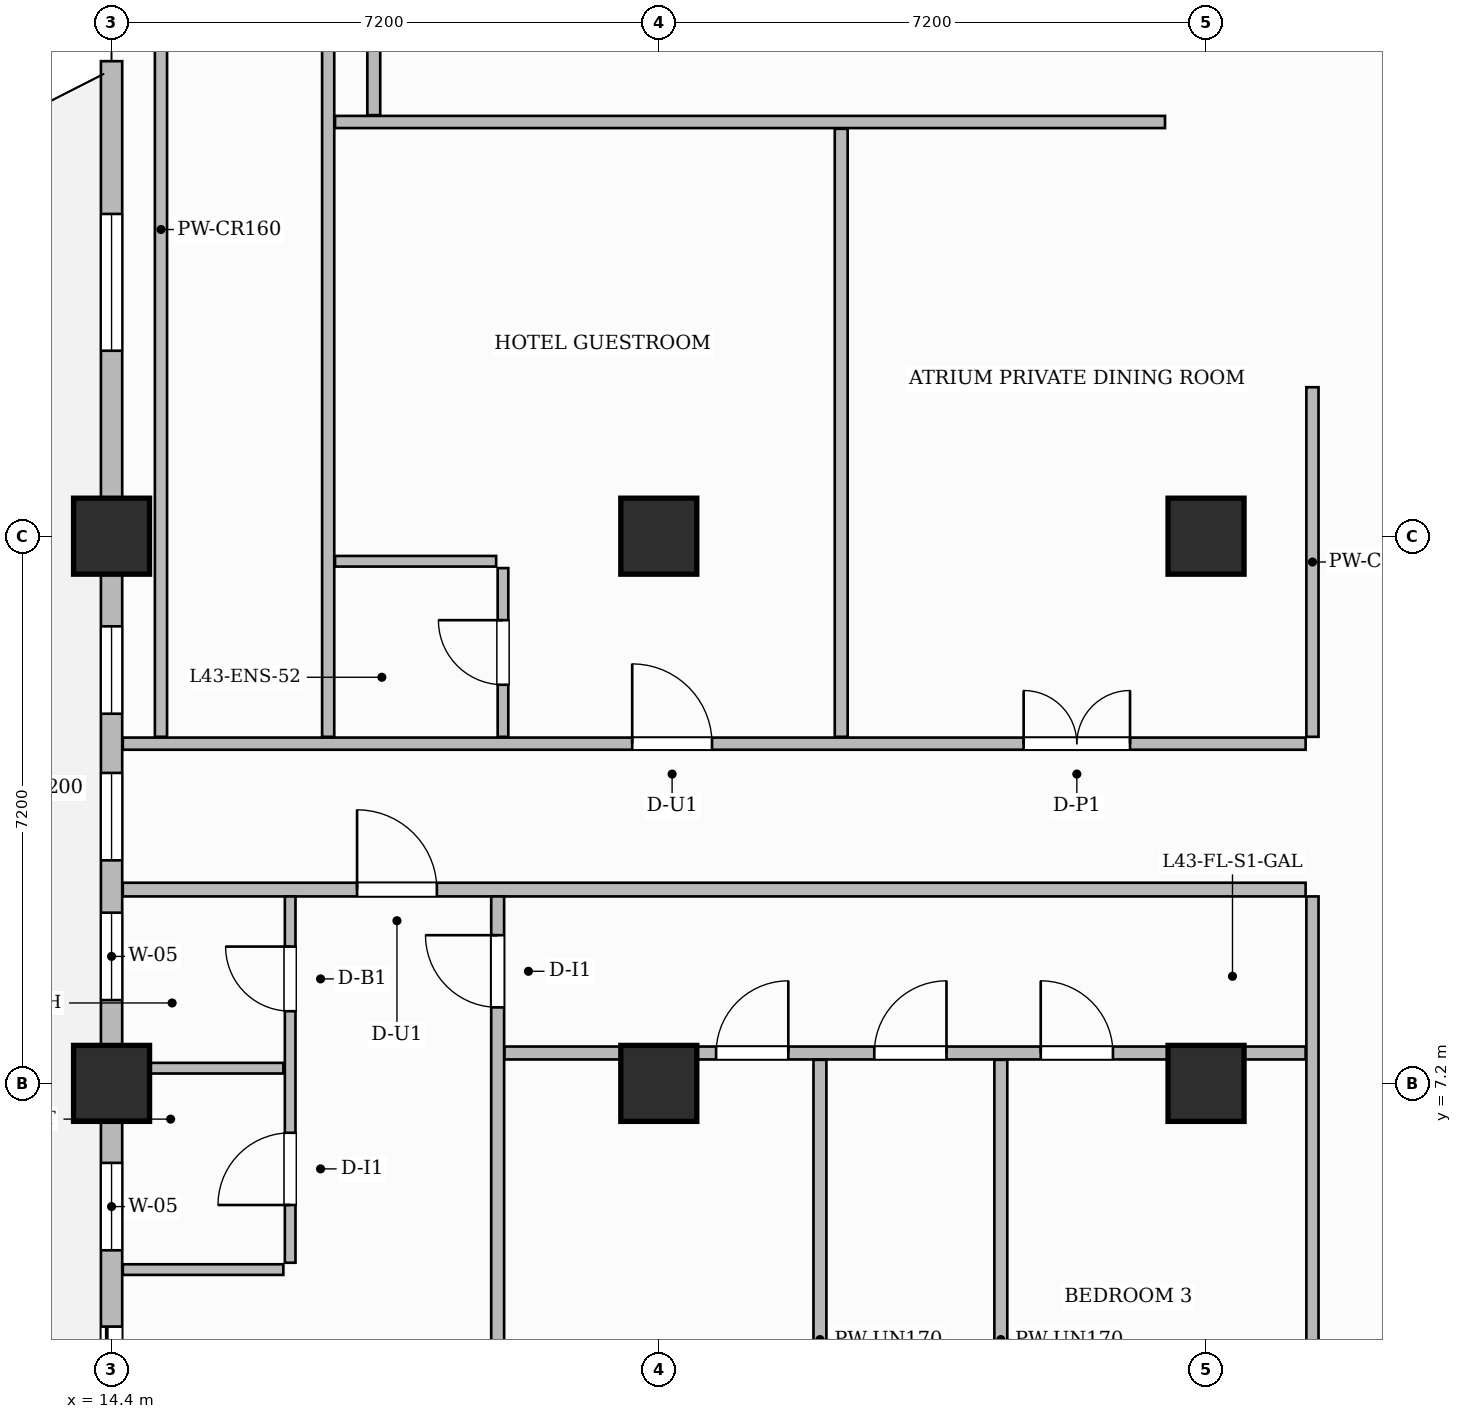
"""IFC4 building model, lengths in metres.
Left out: names, types, materials, properties, quantities, classifications, styles, units other than length and angle.
Written with IfcOpenShell. Run it as: python <this file> out.ifc"""

import sys

from ifc_helpers import new_model, si_unit, direction, frame, frame_2d, origin, origin_2d, place, context, subcontext, project, spatial, rectangle, extrude, source, transform, mapped, element, fill, save


model = new_model("IFC4")
c1 = context("Model", 3, precision=1e-05, world=origin(), true_north=direction((0.0, 1.0)))
c2 = subcontext(c1, "Body", "Model", "MODEL_VIEW")
j1 = project(units=[si_unit("LENGTHUNIT", "METRE"), si_unit("PLANEANGLEUNIT", "RADIAN")], contexts=[c1])
p1 = place(None, origin())
s1 = spatial("IfcSite", under=j1, at=p1, CompositionType="ELEMENT")
p2 = place(p1, origin())
s2 = spatial("IfcBuilding", under=s1, at=p2, CompositionType="ELEMENT")
p3 = place(p2, frame((0.0, 0.0, 173.4)))
s3 = spatial("IfcBuildingStorey", under=s2, at=p3, CompositionType="ELEMENT", Elevation=173.4)
m1 = source(origin(), c2, "Body", "SweptSolid", [
    extrude(rectangle(XDim=1.0, YDim=1.0, at=origin_2d()), origin(), (0.0, 0.0, 1.0), 3.85),
])
for number, where, z_axis, x_axis in (
    (1, (14.4, 7.2, 0.0), (0.0, 0.0, 1.0), (1.0, 0.0, 0.0)),
    (2, (14.4, 14.4, 0.0), (0.0, 0.0, 1.0), (1.0, 0.0, 0.0)),
    (3, (21.6, 7.2, 0.0), (0.0, 0.0, 1.0), (1.0, 0.0, 0.0)),
    (4, (21.6, 14.4, 0.0), (0.0, 0.0, 1.0), (1.0, 0.0, 0.0)),
    (5, (28.8, 7.2, 0.0), (0.0, 0.0, 1.0), (1.0, 0.0, 0.0)),
    (6, (28.8, 14.4, 0.0), (0.0, 0.0, 1.0), (1.0, 0.0, 0.0)),
):
    element("IfcColumn", number, at=place(p3, frame(where, z_axis=z_axis, x_axis=x_axis)), inside=s3, PredefinedType="COLUMN", context=c2, shape_type="MappedRepresentation", body=[
        mapped(m1, transform((0.0, 0.0, 0.0), scale=1.0)),
    ])
p4 = place(p3, frame((14.548, 9.75, 0.0), z_axis=(0.0, 0.0, 1.0), x_axis=(1.0, 0.0, 0.0)))
e7 = element("IfcWall", 7, at=p4, inside=s3, PredefinedType="PARTITIONING", context=c2, shape_type="SweptSolid", body=[
    extrude(rectangle(XDim=15.562, YDim=0.18, at=frame_2d((7.781, 0.0))), origin(), (0.0, 0.0, 1.0), 3.6),
])
p5 = place(p4, frame((3.082, 0.0, 0.0)))
e8 = element("IfcOpeningElement", 8, at=p5, cuts=e7, PredefinedType="OPENING", context=c2, shape_type="SweptSolid", body=[
    extrude(rectangle(XDim=1.05, YDim=2.25, at=frame_2d((0.525, 1.125))), frame((0.0, 0.1, 0.0), z_axis=(0.0, -1.0, 0.0), x_axis=(1.0, 0.0, 0.0)), (0.0, 0.0, 1.0), 0.2),
])
p6 = place(p3, frame((14.548, 11.67, 0.0), z_axis=(0.0, 0.0, 1.0), x_axis=(1.0, 0.0, 0.0)))
e9 = element("IfcWall", 9, at=p6, inside=s3, PredefinedType="PARTITIONING", context=c2, shape_type="SweptSolid", body=[
    extrude(rectangle(XDim=15.562, YDim=0.16, at=frame_2d((7.781, 0.0))), origin(), (0.0, 0.0, 1.0), 3.6),
])
p7 = place(p6, frame((6.702, 0.0, 0.0)))
e10 = element("IfcOpeningElement", 10, at=p7, cuts=e9, PredefinedType="OPENING", context=c2, shape_type="SweptSolid", body=[
    extrude(rectangle(XDim=1.05, YDim=2.25, at=frame_2d((0.525, 1.125))), frame((0.0, 0.09, 0.0), z_axis=(0.0, -1.0, 0.0), x_axis=(1.0, 0.0, 0.0)), (0.0, 0.0, 1.0), 0.18),
])
p8 = place(p6, frame((11.852, 0.0, 0.0)))
e11 = element("IfcOpeningElement", 11, at=p8, cuts=e9, PredefinedType="OPENING", context=c2, shape_type="SweptSolid", body=[
    extrude(rectangle(XDim=1.4, YDim=2.35, at=frame_2d((0.7, 1.175))), frame((0.0, 0.09, 0.0), z_axis=(0.0, -1.0, 0.0), x_axis=(1.0, 0.0, 0.0)), (0.0, 0.0, 1.0), 0.18),
])
p9 = place(p3, frame((30.2, 11.76, 0.0), z_axis=(0.0, 0.0, 1.0), x_axis=(0.0, 1.0, 0.0)))
e12 = element("IfcWall", 12, at=p9, inside=s3, PredefinedType="PARTITIONING", context=c2, shape_type="SweptSolid", body=[
    extrude(rectangle(XDim=4.6, YDim=0.16, at=frame_2d((2.3, 0.0))), origin(), (0.0, 0.0, 1.0), 3.6),
])
p10 = place(p3, frame((30.2, 0.148, 0.0), z_axis=(0.0, 0.0, 1.0), x_axis=(0.0, 1.0, 0.0)))
e13 = element("IfcWall", 13, at=p10, inside=s3, PredefinedType="PARTITIONING", context=c2, shape_type="SweptSolid", body=[
    extrude(rectangle(XDim=9.512, YDim=0.16, at=frame_2d((4.756, 0.0))), origin(), (0.0, 0.0, 1.0), 3.6),
])
p11 = place(p10, frame((1.977, 0.0, 0.0)))
e14 = element("IfcOpeningElement", 14, at=p11, cuts=e13, PredefinedType="OPENING", context=c2, shape_type="SweptSolid", body=[
    extrude(rectangle(XDim=1.05, YDim=2.15, at=frame_2d((0.525, 1.075))), frame((0.0, 0.09, 0.0), z_axis=(0.0, -1.0, 0.0), x_axis=(1.0, 0.0, 0.0)), (0.0, 0.0, 1.0), 0.18),
])
p12 = place(p3, frame((16.75, 4.84, 0.0), z_axis=(0.0, 0.0, 1.0), x_axis=(0.0, 1.0, 0.0)))
e15 = element("IfcWall", 15, at=p12, inside=s3, PredefinedType="PARTITIONING", context=c2, shape_type="SweptSolid", body=[
    extrude(rectangle(XDim=4.82, YDim=0.14, at=frame_2d((2.41, 0.0))), origin(), (0.0, 0.0, 1.0), 3.6),
])
p13 = place(p12, frame((0.76, 0.0, 0.0)))
e16 = element("IfcOpeningElement", 16, at=p13, cuts=e15, PredefinedType="OPENING", context=c2, shape_type="SweptSolid", body=[
    extrude(rectangle(XDim=0.95, YDim=2.15, at=frame_2d((0.475, 1.075))), frame((0.0, 0.08, 0.0), z_axis=(0.0, -1.0, 0.0), x_axis=(1.0, 0.0, 0.0)), (0.0, 0.0, 1.0), 0.16),
])
p14 = place(p12, frame((3.31, 0.0, 0.0)))
e17 = element("IfcOpeningElement", 17, at=p14, cuts=e15, PredefinedType="OPENING", context=c2, shape_type="SweptSolid", body=[
    extrude(rectangle(XDim=0.85, YDim=2.1, at=frame_2d((0.425, 1.05))), frame((0.0, 0.08, 0.0), z_axis=(0.0, -1.0, 0.0), x_axis=(1.0, 0.0, 0.0)), (0.0, 0.0, 1.0), 0.16),
])
p15 = place(p3, frame((14.59, 7.4, 0.0), z_axis=(0.0, 0.0, 1.0), x_axis=(1.0, 0.0, 0.0)))
e18 = element("IfcWall", 18, at=p15, inside=s3, PredefinedType="PARTITIONING", context=c2, shape_type="SweptSolid", body=[
    extrude(rectangle(XDim=2.07, YDim=0.14, at=frame_2d((1.035, 0.0))), origin(), (0.0, 0.0, 1.0), 3.085),
])
p16 = place(p3, frame((14.548, 4.75, 0.0), z_axis=(0.0, 0.0, 1.0), x_axis=(1.0, 0.0, 0.0)))
e19 = element("IfcWall", 19, at=p16, inside=s3, PredefinedType="PARTITIONING", context=c2, shape_type="SweptSolid", body=[
    extrude(rectangle(XDim=2.112, YDim=0.14, at=frame_2d((1.056, 0.0))), origin(), (0.0, 0.0, 1.0), 3.6),
])
p17 = place(p3, frame((19.48, 0.148, 0.0), z_axis=(0.0, 0.0, 1.0), x_axis=(0.0, 1.0, 0.0)))
e20 = element("IfcWall", 20, at=p17, inside=s3, PredefinedType="PARTITIONING", context=c2, shape_type="SweptSolid", body=[
    extrude(rectangle(XDim=9.512, YDim=0.17, at=frame_2d((4.756, 0.0))), origin(), (0.0, 0.0, 1.0), 3.6),
])
p18 = place(p17, frame((8.052, 0.0, 0.0)))
e21 = element("IfcOpeningElement", 21, at=p18, cuts=e20, PredefinedType="OPENING", context=c2, shape_type="SweptSolid", body=[
    extrude(rectangle(XDim=0.95, YDim=2.15, at=frame_2d((0.475, 1.075))), frame((0.0, 0.095, 0.0), z_axis=(0.0, -1.0, 0.0), x_axis=(1.0, 0.0, 0.0)), (0.0, 0.0, 1.0), 0.19),
])
p19 = place(p3, frame((19.57, 7.6, 0.0), z_axis=(0.0, 0.0, 1.0), x_axis=(1.0, 0.0, 0.0)))
e22 = element("IfcWall", 22, at=p19, inside=s3, PredefinedType="PARTITIONING", context=c2, shape_type="SweptSolid", body=[
    extrude(rectangle(XDim=10.54, YDim=0.17, at=frame_2d((5.27, 0.0))), origin(), (0.0, 0.0, 1.0), 3.6),
])
p20 = place(p19, frame((2.784, 0.0, 0.0)))
e23 = element("IfcOpeningElement", 23, at=p20, cuts=e22, PredefinedType="OPENING", context=c2, shape_type="SweptSolid", body=[
    extrude(rectangle(XDim=0.95, YDim=2.15, at=frame_2d((0.475, 1.075))), frame((0.0, 0.095, 0.0), z_axis=(0.0, -1.0, 0.0), x_axis=(1.0, 0.0, 0.0)), (0.0, 0.0, 1.0), 0.19),
])
p21 = place(p19, frame((4.865, 0.0, 0.0)))
e24 = element("IfcOpeningElement", 24, at=p21, cuts=e22, PredefinedType="OPENING", context=c2, shape_type="SweptSolid", body=[
    extrude(rectangle(XDim=0.95, YDim=2.15, at=frame_2d((0.475, 1.075))), frame((0.0, 0.095, 0.0), z_axis=(0.0, -1.0, 0.0), x_axis=(1.0, 0.0, 0.0)), (0.0, 0.0, 1.0), 0.19),
])
p22 = place(p19, frame((7.055, 0.0, 0.0)))
e25 = element("IfcOpeningElement", 25, at=p22, cuts=e22, PredefinedType="OPENING", context=c2, shape_type="SweptSolid", body=[
    extrude(rectangle(XDim=0.95, YDim=2.15, at=frame_2d((0.475, 1.075))), frame((0.0, 0.095, 0.0), z_axis=(0.0, -1.0, 0.0), x_axis=(1.0, 0.0, 0.0)), (0.0, 0.0, 1.0), 0.19),
])
for number, where, z_axis, x_axis in (
    (26, (23.72, 0.148, 0.0), (0.0, 0.0, 1.0), (0.0, 1.0, 0.0)),
    (27, (26.1, 0.148, 0.0), (0.0, 0.0, 1.0), (0.0, 1.0, 0.0)),
):
    element("IfcWall", number, at=place(p3, frame(where, z_axis=z_axis, x_axis=x_axis)), inside=s3, PredefinedType="PARTITIONING", context=c2, shape_type="SweptSolid", body=[
        extrude(rectangle(XDim=7.362, YDim=0.17, at=frame_2d((3.681, 0.0))), origin(), (0.0, 0.0, 1.0), 3.6),
    ])
for number, where, z_axis, x_axis in (
    (28, (15.05, 11.76, 0.0), (0.0, 0.0, 1.0), (0.0, 1.0, 0.0)),
    (29, (17.25, 11.76, 0.0), (0.0, 0.0, 1.0), (0.0, 1.0, 0.0)),
):
    element("IfcWall", number, at=place(p3, frame(where, z_axis=z_axis, x_axis=x_axis)), inside=s3, PredefinedType="PARTITIONING", context=c2, shape_type="SweptSolid", body=[
        extrude(rectangle(XDim=13.35, YDim=0.16, at=frame_2d((6.675, 0.0))), origin(), (0.0, 0.0, 1.0), 3.6),
    ])
p23 = place(p3, frame((17.85, 19.94, 0.0), z_axis=(0.0, 0.0, 1.0), x_axis=(0.0, 1.0, 0.0)))
e30 = element("IfcWall", 30, at=p23, inside=s3, PredefinedType="PARTITIONING", context=c2, shape_type="SweptSolid", body=[
    extrude(rectangle(XDim=5.22, YDim=0.17, at=frame_2d((2.61, 0.0))), origin(), (0.0, 0.0, 1.0), 3.285),
])
p24 = place(p3, frame((17.34, 19.85, 0.0), z_axis=(0.0, 0.0, 1.0), x_axis=(1.0, 0.0, 0.0)))
e31 = element("IfcWall", 31, at=p24, inside=s3, PredefinedType="PARTITIONING", context=c2, shape_type="SweptSolid", body=[
    extrude(rectangle(XDim=10.92, YDim=0.16, at=frame_2d((5.46, 0.0))), origin(), (0.0, 0.0, 1.0), 3.6),
])
p25 = place(p3, frame((24.0, 11.76, 0.0), z_axis=(0.0, 0.0, 1.0), x_axis=(0.0, 1.0, 0.0)))
e32 = element("IfcWall", 32, at=p25, inside=s3, PredefinedType="PARTITIONING", context=c2, shape_type="SweptSolid", body=[
    extrude(rectangle(XDim=8.0, YDim=0.17, at=frame_2d((4.0, 0.0))), origin(), (0.0, 0.0, 1.0), 3.6),
])
p26 = place(p3, frame((19.55, 11.76, 0.0), z_axis=(0.0, 0.0, 1.0), x_axis=(0.0, 1.0, 0.0)))
e33 = element("IfcWall", 33, at=p26, inside=s3, PredefinedType="PARTITIONING", context=c2, shape_type="SweptSolid", body=[
    extrude(rectangle(XDim=2.22, YDim=0.14, at=frame_2d((1.11, 0.0))), origin(), (0.0, 0.0, 1.0), 3.6),
])
p27 = place(p26, frame((0.685, 0.0, 0.0)))
e34 = element("IfcOpeningElement", 34, at=p27, cuts=e33, PredefinedType="OPENING", context=c2, shape_type="SweptSolid", body=[
    extrude(rectangle(XDim=0.85, YDim=2.1, at=frame_2d((0.425, 1.05))), frame((0.0, 0.08, 0.0), z_axis=(0.0, -1.0, 0.0), x_axis=(1.0, 0.0, 0.0)), (0.0, 0.0, 1.0), 0.16),
])
p28 = place(p3, frame((17.34, 14.07, 0.0), z_axis=(0.0, 0.0, 1.0), x_axis=(1.0, 0.0, 0.0)))
e35 = element("IfcWall", 35, at=p28, inside=s3, PredefinedType="PARTITIONING", context=c2, shape_type="SweptSolid", body=[
    extrude(rectangle(XDim=2.12, YDim=0.14, at=frame_2d((1.06, 0.0))), origin(), (0.0, 0.0, 1.0), 3.6),
])
p29 = place(p3, frame((14.4, 0.05, 0.0), z_axis=(0.0, 0.0, 1.0), x_axis=(0.0, 1.0, 0.0)))
e36 = element("IfcWall", 36, at=p29, inside=s3, PredefinedType="SOLIDWALL", context=c2, shape_type="SweptSolid", body=[
    extrude(rectangle(XDim=20.6, YDim=0.28, at=frame_2d((10.3, 0.0))), origin(), (0.0, 0.0, 1.0), 3.085),
])
p30 = place(p29, frame((2.75, 0.0, 0.0)))
e37 = element("IfcOpeningElement", 37, at=p30, cuts=e36, PredefinedType="OPENING", context=c2, shape_type="SweptSolid", body=[
    extrude(rectangle(XDim=1.2, YDim=2.2, at=frame_2d((0.6, 1.1))), frame((0.0, 0.15, 0.0), z_axis=(0.0, -1.0, 0.0), x_axis=(1.0, 0.0, 0.0)), (0.0, 0.0, 1.0), 0.3),
])
p31 = place(p29, frame((1.025, 0.0, 0.8)))
e38 = element("IfcOpeningElement", 38, at=p31, cuts=e36, PredefinedType="OPENING", context=c2, shape_type="SweptSolid", body=[
    extrude(rectangle(XDim=1.15, YDim=1.8, at=frame_2d((0.575, 0.9))), frame((0.0, 0.15, 0.0), z_axis=(0.0, -1.0, 0.0), x_axis=(1.0, 0.0, 0.0)), (0.0, 0.0, 1.0), 0.3),
])
p32 = place(p29, frame((4.954, 0.0, 0.8)))
e39 = element("IfcOpeningElement", 39, at=p32, cuts=e36, PredefinedType="OPENING", context=c2, shape_type="SweptSolid", body=[
    extrude(rectangle(XDim=1.15, YDim=1.8, at=frame_2d((0.575, 0.9))), frame((0.0, 0.15, 0.0), z_axis=(0.0, -1.0, 0.0), x_axis=(1.0, 0.0, 0.0)), (0.0, 0.0, 1.0), 0.3),
])
p33 = place(p29, frame((8.246, 0.0, 0.8)))
e40 = element("IfcOpeningElement", 40, at=p33, cuts=e36, PredefinedType="OPENING", context=c2, shape_type="SweptSolid", body=[
    extrude(rectangle(XDim=1.15, YDim=1.8, at=frame_2d((0.575, 0.9))), frame((0.0, 0.15, 0.0), z_axis=(0.0, -1.0, 0.0), x_axis=(1.0, 0.0, 0.0)), (0.0, 0.0, 1.0), 0.3),
])
p34 = place(p29, frame((10.085, 0.0, 0.8)))
e41 = element("IfcOpeningElement", 41, at=p34, cuts=e36, PredefinedType="OPENING", context=c2, shape_type="SweptSolid", body=[
    extrude(rectangle(XDim=1.15, YDim=1.8, at=frame_2d((0.575, 0.9))), frame((0.0, 0.15, 0.0), z_axis=(0.0, -1.0, 0.0), x_axis=(1.0, 0.0, 0.0)), (0.0, 0.0, 1.0), 0.3),
])
p35 = place(p29, frame((12.014, 0.0, 0.8)))
e42 = element("IfcOpeningElement", 42, at=p35, cuts=e36, PredefinedType="OPENING", context=c2, shape_type="SweptSolid", body=[
    extrude(rectangle(XDim=1.15, YDim=1.8, at=frame_2d((0.575, 0.9))), frame((0.0, 0.15, 0.0), z_axis=(0.0, -1.0, 0.0), x_axis=(1.0, 0.0, 0.0)), (0.0, 0.0, 1.0), 0.3),
])
p36 = place(p29, frame((16.79, 0.0, 0.8)))
e43 = element("IfcOpeningElement", 43, at=p36, cuts=e36, PredefinedType="OPENING", context=c2, shape_type="SweptSolid", body=[
    extrude(rectangle(XDim=1.8, YDim=1.85, at=frame_2d((0.9, 0.925))), frame((0.0, 0.15, 0.0), z_axis=(0.0, -1.0, 0.0), x_axis=(1.0, 0.0, 0.0)), (0.0, 0.0, 1.0), 0.3),
])
m2 = source(origin(), c2, "Body", "SweptSolid", [
    extrude(rectangle(XDim=0.95, YDim=2.15, at=frame_2d((0.475, 1.075))), frame((0.0, 0.025, 0.0), z_axis=(0.0, -1.0, 0.0), x_axis=(1.0, 0.0, 0.0)), (0.0, 0.0, 1.0), 0.05),
])
p37 = place(p13, origin())
e44 = element("IfcDoor", 44, at=p37, inside=s3, OperationType="SINGLE_SWING_LEFT", PredefinedType="DOOR", context=c2, shape_type="MappedRepresentation", body=[
    mapped(m2, transform((0.0, 0.0, 0.0), scale=1.0)),
])
fill(e16, e44)
m3 = source(origin(), c2, "Body", "SweptSolid", [
    extrude(rectangle(XDim=0.85, YDim=2.1, at=frame_2d((0.425, 1.05))), frame((0.0, 0.025, 0.0), z_axis=(0.0, -1.0, 0.0), x_axis=(1.0, 0.0, 0.0)), (0.0, 0.0, 1.0), 0.05),
])
p38 = place(p14, origin())
e45 = element("IfcDoor", 45, at=p38, inside=s3, OperationType="SINGLE_SWING_RIGHT", PredefinedType="DOOR", context=c2, shape_type="MappedRepresentation", body=[
    mapped(m3, transform((0.0, 0.0, 0.0), scale=1.0)),
])
fill(e17, e45)
m4 = source(origin(), c2, "Body", "SweptSolid", [
    extrude(rectangle(XDim=1.05, YDim=2.25, at=frame_2d((0.525, 1.125))), frame((0.0, 0.025, 0.0), z_axis=(0.0, -1.0, 0.0), x_axis=(1.0, 0.0, 0.0)), (0.0, 0.0, 1.0), 0.05),
])
p39 = place(p5, origin())
e46 = element("IfcDoor", 46, at=p39, inside=s3, OperationType="SINGLE_SWING_LEFT", PredefinedType="DOOR", context=c2, shape_type="MappedRepresentation", body=[
    mapped(m4, transform((0.0, 0.0, 0.0), scale=1.0)),
])
fill(e8, e46)
p40 = place(p18, origin())
e47 = element("IfcDoor", 47, at=p40, inside=s3, OperationType="SINGLE_SWING_RIGHT", PredefinedType="DOOR", context=c2, shape_type="MappedRepresentation", body=[
    mapped(m2, transform((0.0, 0.0, 0.0), scale=1.0)),
])
fill(e21, e47)
p41 = place(p20, origin())
e48 = element("IfcDoor", 48, at=p41, inside=s3, OperationType="SINGLE_SWING_RIGHT", PredefinedType="DOOR", context=c2, shape_type="MappedRepresentation", body=[
    mapped(m2, transform((0.0, 0.0, 0.0), scale=1.0)),
])
fill(e23, e48)
p42 = place(p21, origin())
e49 = element("IfcDoor", 49, at=p42, inside=s3, OperationType="SINGLE_SWING_RIGHT", PredefinedType="DOOR", context=c2, shape_type="MappedRepresentation", body=[
    mapped(m2, transform((0.0, 0.0, 0.0), scale=1.0)),
])
fill(e24, e49)
p43 = place(p22, origin())
e50 = element("IfcDoor", 50, at=p43, inside=s3, OperationType="SINGLE_SWING_LEFT", PredefinedType="DOOR", context=c2, shape_type="MappedRepresentation", body=[
    mapped(m2, transform((0.0, 0.0, 0.0), scale=1.0)),
])
fill(e25, e50)
p44 = place(p27, origin())
e51 = element("IfcDoor", 51, at=p44, inside=s3, OperationType="SINGLE_SWING_RIGHT", PredefinedType="DOOR", context=c2, shape_type="MappedRepresentation", body=[
    mapped(m3, transform((0.0, 0.0, 0.0), scale=1.0)),
])
fill(e34, e51)
p45 = place(p7, origin())
e52 = element("IfcDoor", 52, at=p45, inside=s3, OperationType="SINGLE_SWING_LEFT", PredefinedType="DOOR", context=c2, shape_type="MappedRepresentation", body=[
    mapped(m4, transform((0.0, 0.0, 0.0), scale=1.0)),
])
fill(e10, e52)
m5 = source(origin(), c2, "Body", "SweptSolid", [
    extrude(rectangle(XDim=1.4, YDim=2.35, at=frame_2d((0.7, 1.175))), frame((0.0, 0.025, 0.0), z_axis=(0.0, -1.0, 0.0), x_axis=(1.0, 0.0, 0.0)), (0.0, 0.0, 1.0), 0.05),
])
p46 = place(p8, origin())
e53 = element("IfcDoor", 53, at=p46, inside=s3, OperationType="DOUBLE_DOOR_SINGLE_SWING", PredefinedType="DOOR", context=c2, shape_type="MappedRepresentation", body=[
    mapped(m5, transform((0.0, 0.0, 0.0), scale=1.0)),
])
fill(e11, e53)
m6 = source(origin(), c2, "Body", "SweptSolid", [
    extrude(rectangle(XDim=1.2, YDim=2.2, at=frame_2d((0.6, 1.1))), frame((0.0, 0.025, 0.0), z_axis=(0.0, -1.0, 0.0), x_axis=(1.0, 0.0, 0.0)), (0.0, 0.0, 1.0), 0.05),
])
p47 = place(p30, origin())
e54 = element("IfcDoor", 54, at=p47, inside=s3, OperationType="SLIDING_TO_LEFT", PredefinedType="DOOR", context=c2, shape_type="MappedRepresentation", body=[
    mapped(m6, transform((0.0, 0.0, 0.0), scale=1.0)),
])
fill(e37, e54)
m7 = source(origin(), c2, "Body", "SweptSolid", [
    extrude(rectangle(XDim=1.15, YDim=1.8, at=frame_2d((0.575, 0.9))), frame((0.0, 0.03, 0.0), z_axis=(0.0, -1.0, 0.0), x_axis=(1.0, 0.0, 0.0)), (0.0, 0.0, 1.0), 0.06),
])
p48 = place(p32, origin())
e55 = element("IfcWindow", 55, at=p48, inside=s3, PartitioningType="SINGLE_PANEL", PredefinedType="WINDOW", context=c2, shape_type="MappedRepresentation", body=[
    mapped(m7, transform((0.0, 0.0, 0.0), scale=1.0)),
])
fill(e39, e55)
p49 = place(p33, origin())
e56 = element("IfcWindow", 56, at=p49, inside=s3, PartitioningType="SINGLE_PANEL", PredefinedType="WINDOW", context=c2, shape_type="MappedRepresentation", body=[
    mapped(m7, transform((0.0, 0.0, 0.0), scale=1.0)),
])
fill(e40, e56)
p50 = place(p34, origin())
e57 = element("IfcWindow", 57, at=p50, inside=s3, PartitioningType="SINGLE_PANEL", PredefinedType="WINDOW", context=c2, shape_type="MappedRepresentation", body=[
    mapped(m7, transform((0.0, 0.0, 0.0), scale=1.0)),
])
fill(e41, e57)
p51 = place(p35, origin())
e58 = element("IfcWindow", 58, at=p51, inside=s3, PartitioningType="SINGLE_PANEL", PredefinedType="WINDOW", context=c2, shape_type="MappedRepresentation", body=[
    mapped(m7, transform((0.0, 0.0, 0.0), scale=1.0)),
])
fill(e42, e58)
m8 = source(origin(), c2, "Body", "SweptSolid", [
    extrude(rectangle(XDim=1.8, YDim=1.85, at=frame_2d((0.9, 0.925))), frame((0.0, 0.03, 0.0), z_axis=(0.0, -1.0, 0.0), x_axis=(1.0, 0.0, 0.0)), (0.0, 0.0, 1.0), 0.06),
])
p52 = place(p36, origin())
e59 = element("IfcWindow", 59, at=p52, inside=s3, PartitioningType="DOUBLE_PANEL_VERTICAL", PredefinedType="WINDOW", context=c2, shape_type="MappedRepresentation", body=[
    mapped(m8, transform((0.0, 0.0, 0.0), scale=1.0)),
])
fill(e43, e59)
save(model, sys.argv[1])
